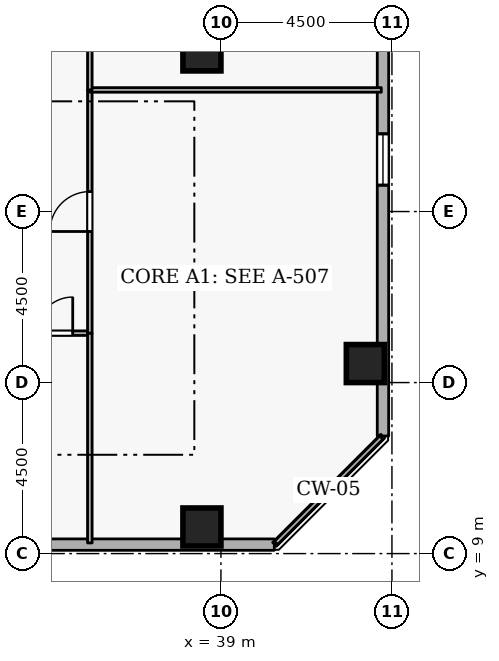
"""IFC4 building model, lengths in metres.
Left out: names, types, materials, properties, quantities, classifications, styles, units other than length and angle.
Written with IfcOpenShell. Run it as: python <this file> out.ifc"""

import sys

from ifc_helpers import new_model, si_unit, direction, frame, frame_2d, origin, origin_2d, place, context, subcontext, project, spatial, rectangle, extrude, element, fill, save


model = new_model("IFC4")
c1 = context("Model", 3, precision=1e-05, world=origin(), true_north=direction((0.0, 1.0)))
c2 = subcontext(c1, "Body", "Model", "MODEL_VIEW")
j1 = project(units=[si_unit("LENGTHUNIT", "METRE"), si_unit("PLANEANGLEUNIT", "RADIAN")], contexts=[c1])
p1 = place(None, origin())
s1 = spatial("IfcSite", under=j1, at=p1, CompositionType="ELEMENT")
p2 = place(p1, origin())
s2 = spatial("IfcBuilding", under=s1, at=p2, CompositionType="ELEMENT")
p3 = place(p2, frame((0.0, 0.0, 218.1)))
s3 = spatial("IfcBuildingStorey", under=s2, at=p3, CompositionType="ELEMENT", Elevation=218.1)
for number, where, z_axis, x_axis in (
    (1, (38.5, 9.7, 0.0), (0.0, 0.0, 1.0), (1.0, 0.0, 0.0)),
    (2, (42.8, 14.0, 0.0), (0.0, 0.0, 1.0), (1.0, 0.0, 0.0)),
    (3, (38.5, 22.2, 0.0), (0.0, 0.0, 1.0), (1.0, 0.0, 0.0)),
):
    element("IfcColumn", number, at=place(p3, frame(where, z_axis=z_axis, x_axis=x_axis)), inside=s3, PredefinedType="COLUMN", context=c2, shape_type="SweptSolid", body=[
        extrude(rectangle(XDim=1.0, YDim=1.0, at=origin_2d()), origin(), (0.0, 0.0, 1.0), 3.6),
    ])
p4 = place(p3, frame((4.319, 9.235, 0.0), z_axis=(0.0, 0.0, 1.0), x_axis=(0.999999999634, 2.7061402e-05, 0.0)))
e4 = element("IfcWall", 4, at=p4, inside=s3, PredefinedType="STANDARD", context=c2, shape_type="SweptSolid", body=[
    extrude(rectangle(XDim=36.087, YDim=0.3, at=frame_2d((18.043, 0.0))), origin(), (0.0, 0.0, 1.0), 2.66),
])
p5 = place(p4, frame((1.8, 0.0, 0.72)))
e5 = element("IfcOpeningElement", 5, at=p5, cuts=e4, PredefinedType="OPENING", context=c2, shape_type="SweptSolid", body=[
    extrude(rectangle(XDim=1.35, YDim=1.05, at=frame_2d((0.675, 0.525))), frame((0.0, 0.16, 0.0), z_axis=(0.0, -1.0, 0.0), x_axis=(1.0, 0.0, 0.0)), (0.0, 0.0, 1.0), 0.32),
])
p6 = place(p4, frame((11.4, 0.0, 0.72)))
e6 = element("IfcOpeningElement", 6, at=p6, cuts=e4, PredefinedType="OPENING", context=c2, shape_type="SweptSolid", body=[
    extrude(rectangle(XDim=1.35, YDim=1.05, at=frame_2d((0.675, 0.525))), frame((0.0, 0.16, 0.0), z_axis=(0.0, -1.0, 0.0), x_axis=(1.0, 0.0, 0.0)), (0.0, 0.0, 1.0), 0.32),
])
p7 = place(p4, frame((16.2, 0.0, 0.72)))
e7 = element("IfcOpeningElement", 7, at=p7, cuts=e4, PredefinedType="OPENING", context=c2, shape_type="SweptSolid", body=[
    extrude(rectangle(XDim=1.35, YDim=1.05, at=frame_2d((0.675, 0.525))), frame((0.0, 0.16, 0.0), z_axis=(0.0, -1.0, 0.0), x_axis=(1.0, 0.0, 0.0)), (0.0, 0.0, 1.0), 0.32),
])
p8 = place(p4, frame((25.8, 0.0, 0.72)))
e8 = element("IfcOpeningElement", 8, at=p8, cuts=e4, PredefinedType="OPENING", context=c2, shape_type="SweptSolid", body=[
    extrude(rectangle(XDim=1.35, YDim=1.05, at=frame_2d((0.675, 0.525))), frame((0.0, 0.16, 0.0), z_axis=(0.0, -1.0, 0.0), x_axis=(1.0, 0.0, 0.0)), (0.0, 0.0, 1.0), 0.32),
])
p9 = place(p3, frame((43.264, 12.094, 0.0), z_axis=(0.0, 0.0, 1.0), x_axis=(2.7061402e-05, 0.999999999634, 0.0)))
e9 = element("IfcWall", 9, at=p9, inside=s3, PredefinedType="STANDARD", context=c2, shape_type="SweptSolid", body=[
    extrude(rectangle(XDim=36.087, YDim=0.3, at=frame_2d((18.043, 0.0))), origin(), (0.0, 0.0, 1.0), 2.66),
])
p10 = place(p9, frame((6.6, 0.0, 0.72)))
e10 = element("IfcOpeningElement", 10, at=p10, cuts=e9, PredefinedType="OPENING", context=c2, shape_type="SweptSolid", body=[
    extrude(rectangle(XDim=1.35, YDim=1.05, at=frame_2d((0.675, 0.525))), frame((0.0, 0.16, 0.0), z_axis=(0.0, -1.0, 0.0), x_axis=(1.0, 0.0, 0.0)), (0.0, 0.0, 1.0), 0.32),
])
p11 = place(p9, frame((21.0, 0.0, 0.72)))
e11 = element("IfcOpeningElement", 11, at=p11, cuts=e9, PredefinedType="OPENING", context=c2, shape_type="SweptSolid", body=[
    extrude(rectangle(XDim=1.35, YDim=1.05, at=frame_2d((0.675, 0.525))), frame((0.0, 0.16, 0.0), z_axis=(0.0, -1.0, 0.0), x_axis=(1.0, 0.0, 0.0)), (0.0, 0.0, 1.0), 0.32),
])
p12 = place(p9, frame((30.6, 0.0, 0.72)))
e12 = element("IfcOpeningElement", 12, at=p12, cuts=e9, PredefinedType="OPENING", context=c2, shape_type="SweptSolid", body=[
    extrude(rectangle(XDim=1.35, YDim=1.05, at=frame_2d((0.675, 0.525))), frame((0.0, 0.16, 0.0), z_axis=(0.0, -1.0, 0.0), x_axis=(1.0, 0.0, 0.0)), (0.0, 0.0, 1.0), 0.32),
])
p13 = place(p3, frame((33.7, 14.8, 0.0), z_axis=(0.0, 0.0, 1.0), x_axis=(1.0, 0.0, 0.0)))
e13 = element("IfcWall", 13, at=p13, inside=s3, PredefinedType="PARTITIONING", context=c2, shape_type="SweptSolid", body=[
    extrude(rectangle(XDim=1.85, YDim=0.12, at=frame_2d((0.925, 0.0))), origin(), (0.0, 0.0, 1.0), 3.26),
])
p14 = place(p13, frame((0.45, 0.0, 0.0)))
e14 = element("IfcOpeningElement", 14, at=p14, cuts=e13, PredefinedType="OPENING", context=c2, shape_type="SweptSolid", body=[
    extrude(rectangle(XDim=0.95, YDim=2.1, at=frame_2d((0.475, 1.05))), frame((0.0, 0.07, 0.0), z_axis=(0.0, -1.0, 0.0), x_axis=(1.0, 0.0, 0.0)), (0.0, 0.0, 1.0), 0.14),
])
p15 = place(p3, frame((35.55, 14.8, 0.0), z_axis=(0.0, 0.0, 1.0), x_axis=(0.0, -1.0, 0.0)))
e15 = element("IfcWall", 15, at=p15, inside=s3, PredefinedType="PARTITIONING", context=c2, shape_type="SweptSolid", body=[
    extrude(rectangle(XDim=5.52, YDim=0.12, at=frame_2d((2.76, 0.0))), origin(), (0.0, 0.0, 1.0), 3.26),
])
p16 = place(p3, frame((35.55, 14.8, 0.0), z_axis=(0.0, 0.0, 1.0), x_axis=(0.0, 1.0, 0.0)))
e16 = element("IfcWall", 16, at=p16, inside=s3, PredefinedType="PARTITIONING", context=c2, shape_type="SweptSolid", body=[
    extrude(rectangle(XDim=6.4, YDim=0.12, at=frame_2d((3.2, 0.0))), origin(), (0.0, 0.0, 1.0), 3.26),
])
p17 = place(p16, frame((2.675, 0.0, 0.0)))
e17 = element("IfcOpeningElement", 17, at=p17, cuts=e16, PredefinedType="OPENING", context=c2, shape_type="SweptSolid", body=[
    extrude(rectangle(XDim=1.05, YDim=2.1, at=frame_2d((0.525, 1.05))), frame((0.0, 0.07, 0.0), z_axis=(0.0, -1.0, 0.0), x_axis=(1.0, 0.0, 0.0)), (0.0, 0.0, 1.0), 0.14),
])
p18 = place(p3, frame((35.55, 21.2, 0.0), z_axis=(0.0, 0.0, 1.0), x_axis=(1.0, 0.0, 0.0)))
e18 = element("IfcWall", 18, at=p18, inside=s3, PredefinedType="PARTITIONING", context=c2, shape_type="SweptSolid", body=[
    extrude(rectangle(XDim=7.67, YDim=0.12, at=frame_2d((3.835, 0.0))), origin(), (0.0, 0.0, 1.0), 3.26),
])
p19 = place(p3, frame((43.22, 12.052, 0.0), z_axis=(0.0, 0.0, 1.0), x_axis=(-0.707106781187, -0.707106781187, 0.0)))
e19 = element("IfcWall", 19, at=p19, inside=s3, PredefinedType="PARTITIONING", context=c2, shape_type="SweptSolid", body=[
    extrude(rectangle(XDim=3.919, YDim=0.12, at=frame_2d((1.96, 0.0))), origin(), (0.0, 0.0, 1.0), 3.26),
])
p20 = place(p3, frame((35.55, 21.2, 0.0), z_axis=(0.0, 0.0, 1.0), x_axis=(0.0, 1.0, 0.0)))
e20 = element("IfcWall", 20, at=p20, inside=s3, PredefinedType="PARTITIONING", context=c2, shape_type="SweptSolid", body=[
    extrude(rectangle(XDim=5.4, YDim=0.12, at=frame_2d((2.7, 0.0))), origin(), (0.0, 0.0, 1.0), 3.26),
])
p21 = place(p20, frame((2.225, 0.0, 0.0)))
e21 = element("IfcOpeningElement", 21, at=p21, cuts=e20, PredefinedType="OPENING", context=c2, shape_type="SweptSolid", body=[
    extrude(rectangle(XDim=0.95, YDim=2.1, at=frame_2d((0.475, 1.05))), frame((0.0, 0.07, 0.0), z_axis=(0.0, -1.0, 0.0), x_axis=(1.0, 0.0, 0.0)), (0.0, 0.0, 1.0), 0.14),
])
p22 = place(p10, origin())
e22 = element("IfcWindow", 22, at=p22, inside=s3, PartitioningType="SINGLE_PANEL", PredefinedType="WINDOW", context=c2, shape_type="SweptSolid", body=[
    extrude(rectangle(XDim=1.35, YDim=1.05, at=frame_2d((0.675, 0.525))), frame((0.0, 0.03, 0.0), z_axis=(0.0, -1.0, 0.0), x_axis=(1.0, 0.0, 0.0)), (0.0, 0.0, 1.0), 0.06),
])
fill(e10, e22)
p23 = place(p14, origin())
e23 = element("IfcDoor", 23, at=p23, inside=s3, OperationType="SINGLE_SWING_RIGHT", PredefinedType="DOOR", context=c2, shape_type="SweptSolid", body=[
    extrude(rectangle(XDim=0.95, YDim=2.1, at=frame_2d((0.475, 1.05))), frame((0.0, 0.025, 0.0), z_axis=(0.0, -1.0, 0.0), x_axis=(1.0, 0.0, 0.0)), (0.0, 0.0, 1.0), 0.05),
])
fill(e14, e23)
p24 = place(p17, origin())
e24 = element("IfcDoor", 24, at=p24, inside=s3, OperationType="SINGLE_SWING_LEFT", PredefinedType="DOOR", context=c2, shape_type="SweptSolid", body=[
    extrude(rectangle(XDim=1.05, YDim=2.1, at=frame_2d((0.525, 1.05))), frame((0.0, 0.025, 0.0), z_axis=(0.0, -1.0, 0.0), x_axis=(1.0, 0.0, 0.0)), (0.0, 0.0, 1.0), 0.05),
])
fill(e17, e24)
save(model, sys.argv[1])
